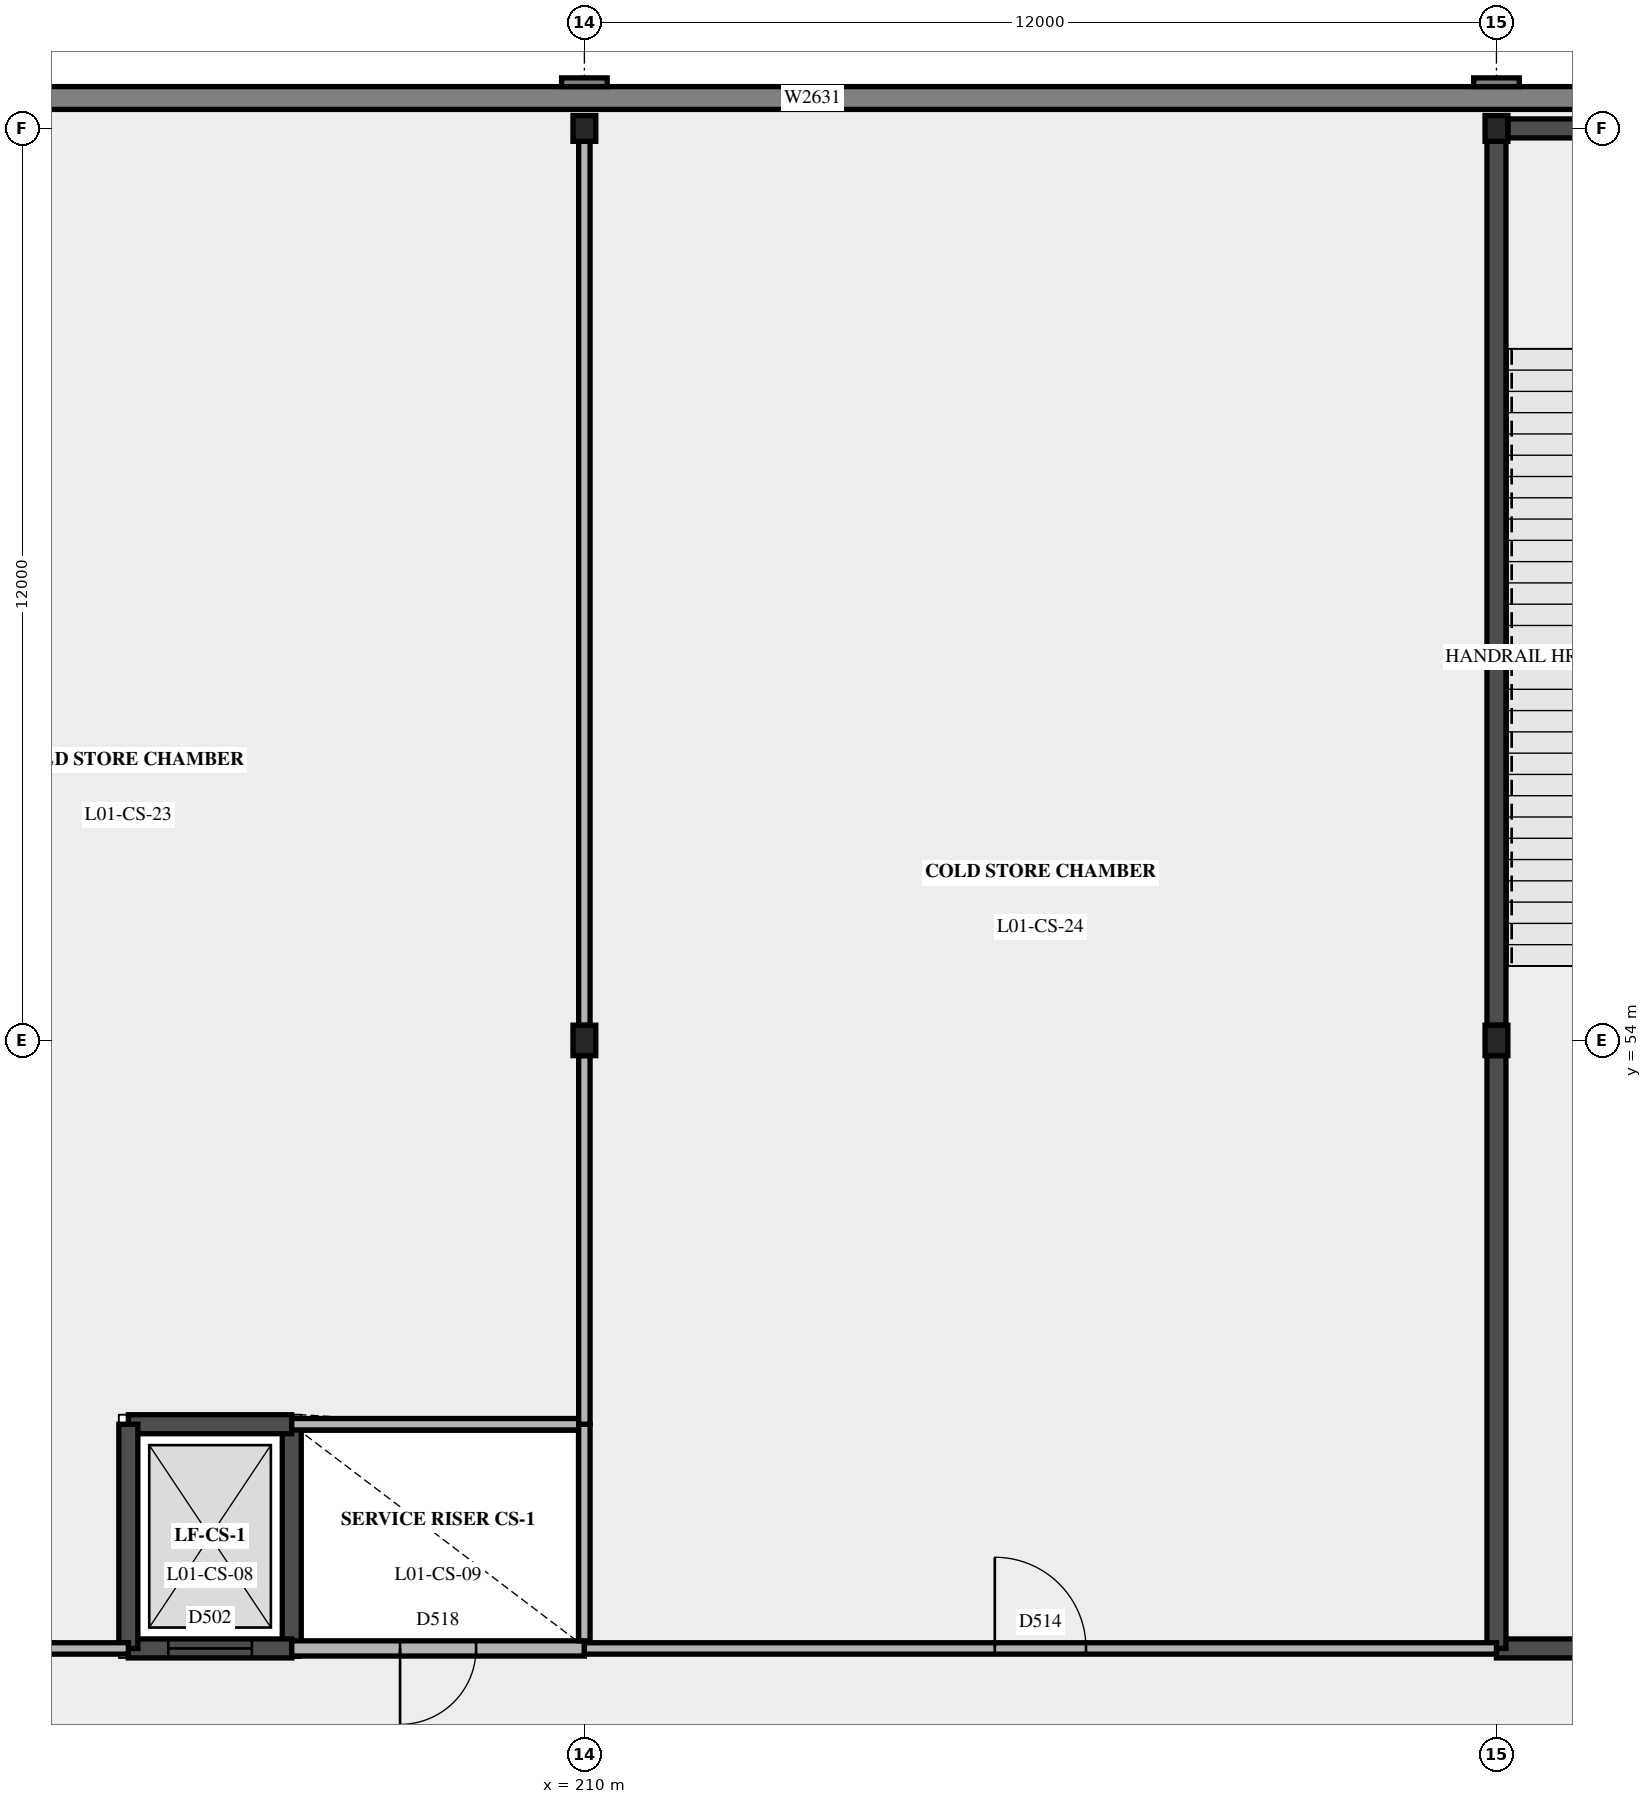
"""IFC4 building model, lengths in metres.
Left out: names, types, materials, properties, quantities, classifications, styles, units other than length and angle.
Written with IfcOpenShell. Run it as: python <this file> out.ifc"""

import sys

from ifc_helpers import new_model, si_unit, direction, frame, frame_2d, origin, origin_2d, place, context, subcontext, project, spatial, polyline, rectangle, i_section, outline, extrude, element, fill, save


model = new_model("IFC4")
c1 = context("Model", 3, precision=1e-05, world=origin(), true_north=direction((0.0, 1.0)))
c2 = subcontext(c1, "Body", "Model", "MODEL_VIEW")
j1 = project(units=[si_unit("LENGTHUNIT", "METRE"), si_unit("PLANEANGLEUNIT", "RADIAN")], contexts=[c1])
p1 = place(None, origin())
s1 = spatial("IfcSite", under=j1, at=p1, CompositionType="ELEMENT")
p2 = place(p1, origin())
s2 = spatial("IfcBuilding", under=s1, at=p2, CompositionType="ELEMENT")
p3 = place(p2, frame((0.0, 0.0, 5.4)))
s3 = spatial("IfcBuildingStorey", under=s2, at=p3, CompositionType="ELEMENT", Elevation=5.4)
p4 = place(p3, frame((210.0, 54.0, 0.0), z_axis=(0.0, 0.0, 1.0), x_axis=(1.0, 0.0, 0.0)))
e1 = element("IfcColumn", 1, at=p4, inside=s3, PredefinedType="COLUMN", context=c2, shape_type="SweptSolid", body=[
    extrude(i_section(OverallWidth=0.3, OverallDepth=0.4, WebThickness=0.013, FlangeThickness=0.024, at=origin_2d()), origin(), (0.0, 0.0, 1.0), 5.4),
])
p5 = place(p3, frame((210.0, 66.0, 0.0), z_axis=(0.0, 0.0, 1.0), x_axis=(1.0, 0.0, 0.0)))
e2 = element("IfcColumn", 2, at=p5, inside=s3, PredefinedType="COLUMN", context=c2, shape_type="SweptSolid", body=[
    extrude(i_section(OverallWidth=0.3, OverallDepth=0.34, WebThickness=0.012, FlangeThickness=0.021, at=origin_2d()), origin(), (0.0, 0.0, 1.0), 5.4),
])
p6 = place(p3, frame((222.0, 54.0, 0.0), z_axis=(0.0, 0.0, 1.0), x_axis=(1.0, 0.0, 0.0)))
e3 = element("IfcColumn", 3, at=p6, inside=s3, PredefinedType="COLUMN", context=c2, shape_type="SweptSolid", body=[
    extrude(i_section(OverallWidth=0.3, OverallDepth=0.4, WebThickness=0.013, FlangeThickness=0.024, at=origin_2d()), origin(), (0.0, 0.0, 1.0), 5.4),
])
p7 = place(p3, frame((222.0, 66.0, 0.0), z_axis=(0.0, 0.0, 1.0), x_axis=(1.0, 0.0, 0.0)))
e4 = element("IfcColumn", 4, at=p7, inside=s3, PredefinedType="COLUMN", context=c2, shape_type="SweptSolid", body=[
    extrude(i_section(OverallWidth=0.3, OverallDepth=0.34, WebThickness=0.012, FlangeThickness=0.021, at=origin_2d()), origin(), (0.0, 0.0, 1.0), 5.4),
])
p8 = place(p3, frame((222.0, 46.0, 0.0), z_axis=(0.0, 0.0, 1.0), x_axis=(1.0, 0.0, 0.0)))
e5 = element("IfcWall", 5, at=p8, inside=s3, PredefinedType="SHEAR", context=c2, shape_type="SweptSolid", body=[
    extrude(rectangle(XDim=6.0, YDim=0.25, at=frame_2d((3.0, 0.0))), origin(), (0.0, 0.0, 1.0), 5.4),
])
p9 = place(p8, frame((2.5, 0.0, 0.0)))
e6 = element("IfcOpeningElement", 6, at=p9, cuts=e5, PredefinedType="OPENING", context=c2, shape_type="SweptSolid", body=[
    extrude(rectangle(XDim=1.0, YDim=2.1, at=frame_2d((0.5, 1.05))), frame((0.0, 0.135, 0.0), z_axis=(0.0, -1.0, 0.0), x_axis=(1.0, 0.0, 0.0)), (0.0, 0.0, 1.0), 0.27),
])
p10 = place(p3, frame((222.15, 66.0, 0.0), z_axis=(0.0, 0.0, 1.0), x_axis=(1.0, 0.0, 0.0)))
e7 = element("IfcWall", 7, at=p10, inside=s3, PredefinedType="SHEAR", context=c2, shape_type="SweptSolid", body=[
    extrude(rectangle(XDim=5.85, YDim=0.25, at=frame_2d((2.925, 0.0))), origin(), (0.0, 0.0, 1.0), 5.4),
])
p11 = place(p3, frame((222.0, 46.0, 0.0), z_axis=(0.0, 0.0, 1.0), x_axis=(0.0, 1.0, 0.0)))
e8 = element("IfcWall", 8, at=p11, inside=s3, PredefinedType="SHEAR", context=c2, shape_type="SweptSolid", body=[
    extrude(rectangle(XDim=7.8, YDim=0.25, at=frame_2d((3.9, 0.0))), origin(), (0.0, 0.0, 1.0), 5.4),
])
p12 = place(p3, frame((222.0, 54.2, 0.0), z_axis=(0.0, 0.0, 1.0), x_axis=(0.0, 1.0, 0.0)))
e9 = element("IfcWall", 9, at=p12, inside=s3, PredefinedType="SHEAR", context=c2, shape_type="SweptSolid", body=[
    extrude(rectangle(XDim=11.63, YDim=0.25, at=frame_2d((5.815, 0.0))), origin(), (0.0, 0.0, 1.0), 5.4),
])
p13 = place(p3, frame((282.25, 66.4, 0.0), z_axis=(0.0, 0.0, 1.0), x_axis=(-1.0, 0.0, 0.0)))
e10 = element("IfcWall", 10, at=p13, inside=s3, PredefinedType="SOLIDWALL", context=c2, shape_type="SweptSolid", body=[
    extrude(rectangle(XDim=84.5, YDim=0.3, at=frame_2d((42.25, 0.0))), origin(), (0.0, 0.0, 1.0), 5.4),
])
p14 = place(p13, frame((9.025, 0.0, 1.8)))
e11 = element("IfcOpeningElement", 11, at=p14, cuts=e10, PredefinedType="OPENING", context=c2, shape_type="SweptSolid", body=[
    extrude(rectangle(XDim=0.45, YDim=2.4, at=frame_2d((0.225, 1.2))), frame((0.0, 0.16, 0.0), z_axis=(0.0, -1.0, 0.0), x_axis=(1.0, 0.0, 0.0)), (0.0, 0.0, 1.0), 0.32),
])
p15 = place(p13, frame((21.025, 0.0, 1.8)))
e12 = element("IfcOpeningElement", 12, at=p15, cuts=e10, PredefinedType="OPENING", context=c2, shape_type="SweptSolid", body=[
    extrude(rectangle(XDim=0.45, YDim=2.4, at=frame_2d((0.225, 1.2))), frame((0.0, 0.16, 0.0), z_axis=(0.0, -1.0, 0.0), x_axis=(1.0, 0.0, 0.0)), (0.0, 0.0, 1.0), 0.32),
])
p16 = place(p13, frame((33.025, 0.0, 1.8)))
e13 = element("IfcOpeningElement", 13, at=p16, cuts=e10, PredefinedType="OPENING", context=c2, shape_type="SweptSolid", body=[
    extrude(rectangle(XDim=0.45, YDim=2.4, at=frame_2d((0.225, 1.2))), frame((0.0, 0.16, 0.0), z_axis=(0.0, -1.0, 0.0), x_axis=(1.0, 0.0, 0.0)), (0.0, 0.0, 1.0), 0.32),
])
p17 = place(p13, frame((45.025, 0.0, 1.8)))
e14 = element("IfcOpeningElement", 14, at=p17, cuts=e10, PredefinedType="OPENING", context=c2, shape_type="SweptSolid", body=[
    extrude(rectangle(XDim=0.45, YDim=2.4, at=frame_2d((0.225, 1.2))), frame((0.0, 0.16, 0.0), z_axis=(0.0, -1.0, 0.0), x_axis=(1.0, 0.0, 0.0)), (0.0, 0.0, 1.0), 0.32),
])
p18 = place(p13, frame((57.025, 0.0, 1.8)))
e15 = element("IfcOpeningElement", 15, at=p18, cuts=e10, PredefinedType="OPENING", context=c2, shape_type="SweptSolid", body=[
    extrude(rectangle(XDim=0.45, YDim=2.4, at=frame_2d((0.225, 1.2))), frame((0.0, 0.16, 0.0), z_axis=(0.0, -1.0, 0.0), x_axis=(1.0, 0.0, 0.0)), (0.0, 0.0, 1.0), 0.32),
])
p19 = place(p13, frame((69.025, 0.0, 1.8)))
e16 = element("IfcOpeningElement", 16, at=p19, cuts=e10, PredefinedType="OPENING", context=c2, shape_type="SweptSolid", body=[
    extrude(rectangle(XDim=0.45, YDim=2.4, at=frame_2d((0.225, 1.2))), frame((0.0, 0.16, 0.0), z_axis=(0.0, -1.0, 0.0), x_axis=(1.0, 0.0, 0.0)), (0.0, 0.0, 1.0), 0.32),
])
p20 = place(p13, frame((81.025, 0.0, 1.8)))
e17 = element("IfcOpeningElement", 17, at=p20, cuts=e10, PredefinedType="OPENING", context=c2, shape_type="SweptSolid", body=[
    extrude(rectangle(XDim=0.45, YDim=2.4, at=frame_2d((0.225, 1.2))), frame((0.0, 0.16, 0.0), z_axis=(0.0, -1.0, 0.0), x_axis=(1.0, 0.0, 0.0)), (0.0, 0.0, 1.0), 0.32),
])
for number, where, z_axis, x_axis in (
    (18, (222.3, 66.607, 0.0), (0.0, 0.0, 1.0), (-1.0, 0.0, 0.0)),
    (19, (210.3, 66.607, 0.0), (0.0, 0.0, 1.0), (-1.0, 0.0, 0.0)),
):
    element("IfcWall", number, at=place(p3, frame(where, z_axis=z_axis, x_axis=x_axis)), inside=s3, PredefinedType="SOLIDWALL", context=c2, shape_type="SweptSolid", body=[
        extrude(rectangle(XDim=0.6, YDim=0.115, at=frame_2d((0.3, 0.0))), origin(), (0.0, 0.0, 1.0), 5.4),
    ])
p21 = place(p3, frame((206.15, 46.0, 0.0), z_axis=(0.0, 0.0, 1.0), x_axis=(0.0, 1.0, 0.0)))
e20 = element("IfcWall", 20, at=p21, inside=s3, PredefinedType="SHEAR", context=c2, shape_type="SweptSolid", body=[
    extrude(rectangle(XDim=2.95, YDim=0.25, at=frame_2d((1.475, 0.0))), origin(), (0.0, 0.0, 1.0), 5.4),
])
p22 = place(p3, frame((206.15, 48.95, 0.0), z_axis=(0.0, 0.0, 1.0), x_axis=(-1.0, 0.0, 0.0)))
e21 = element("IfcWall", 21, at=p22, inside=s3, PredefinedType="SHEAR", context=c2, shape_type="SweptSolid", body=[
    extrude(rectangle(XDim=2.15, YDim=0.25, at=frame_2d((1.075, 0.0))), origin(), (0.0, 0.0, 1.0), 5.4),
])
p23 = place(p3, frame((204.0, 46.0, 0.0), z_axis=(0.0, 0.0, 1.0), x_axis=(1.0, 0.0, 0.0)))
e22 = element("IfcWall", 22, at=p23, inside=s3, PredefinedType="SHEAR", context=c2, shape_type="SweptSolid", body=[
    extrude(rectangle(XDim=2.15, YDim=0.25, at=frame_2d((1.075, 0.0))), origin(), (0.0, 0.0, 1.0), 5.4),
])
p24 = place(p23, frame((0.525, 0.0, 0.0)))
e23 = element("IfcOpeningElement", 23, at=p24, cuts=e22, PredefinedType="OPENING", context=c2, shape_type="SweptSolid", body=[
    extrude(rectangle(XDim=1.1, YDim=2.1, at=frame_2d((0.55, 1.05))), frame((0.0, 0.135, 0.0), z_axis=(0.0, -1.0, 0.0), x_axis=(1.0, 0.0, 0.0)), (0.0, 0.0, 1.0), 0.27),
])
p25 = place(p3, frame((204.0, 48.95, 0.0), z_axis=(0.0, 0.0, 1.0), x_axis=(0.0, -1.0, 0.0)))
e24 = element("IfcWall", 24, at=p25, inside=s3, PredefinedType="SHEAR", context=c2, shape_type="SweptSolid", body=[
    extrude(rectangle(XDim=2.95, YDim=0.25, at=frame_2d((1.475, 0.0))), origin(), (0.0, 0.0, 1.0), 5.4),
])
p26 = place(p3, frame((198.0, 46.0, 0.0), z_axis=(0.0, 0.0, 1.0), x_axis=(1.0, 0.0, 0.0)))
e25 = element("IfcWall", 25, at=p26, inside=s3, PredefinedType="PARTITIONING", context=c2, shape_type="SweptSolid", body=[
    extrude(outline(polyline([(0.0, 0.0), (6.0, 0.0), (6.0, 5.15), (4.905, 5.15), (4.9, 4.63), (4.7, 4.63), (4.695, 5.15), (2.505, 5.15), (2.5, 4.63), (2.3, 4.63), (2.295, 5.15), (0.1, 5.15), (0.095, 4.68), (0.0, 4.68), (0.0, 0.0)])), frame((0.0, 0.075, 0.0), z_axis=(0.0, -1.0, 0.0), x_axis=(1.0, 0.0, 0.0)), (0.0, 0.0, 1.0), 0.15),
])
p27 = place(p26, frame((2.4, 0.0, 0.0)))
e26 = element("IfcOpeningElement", 26, at=p27, cuts=e25, PredefinedType="OPENING", context=c2, shape_type="SweptSolid", body=[
    extrude(rectangle(XDim=1.2, YDim=2.4, at=frame_2d((0.6, 1.2))), frame((0.0, 0.085, 0.0), z_axis=(0.0, -1.0, 0.0), x_axis=(1.0, 0.0, 0.0)), (0.0, 0.0, 1.0), 0.17),
])
p28 = place(p3, frame((206.15, 46.0, 0.0), z_axis=(0.0, 0.0, 1.0), x_axis=(1.0, 0.0, 0.0)))
e27 = element("IfcWall", 27, at=p28, inside=s3, PredefinedType="PARTITIONING", context=c2, shape_type="SweptSolid", body=[
    extrude(outline(polyline([(0.0, 0.0), (3.85, 0.0), (3.85, 4.68), (3.755, 4.68), (3.75, 5.15), (1.555, 5.15), (1.55, 4.63), (1.35, 4.63), (1.345, 5.15), (0.0, 5.15), (0.0, 0.0)])), frame((0.0, 0.1, 0.0), z_axis=(0.0, -1.0, 0.0), x_axis=(1.0, 0.0, 0.0)), (0.0, 0.0, 1.0), 0.2),
])
p29 = place(p28, frame((1.425, 0.0, 0.0)))
e28 = element("IfcOpeningElement", 28, at=p29, cuts=e27, PredefinedType="OPENING", context=c2, shape_type="SweptSolid", body=[
    extrude(rectangle(XDim=1.0, YDim=2.1, at=frame_2d((0.5, 1.05))), frame((0.0, 0.11, 0.0), z_axis=(0.0, -1.0, 0.0), x_axis=(1.0, 0.0, 0.0)), (0.0, 0.0, 1.0), 0.22),
])
p30 = place(p3, frame((210.0, 46.0, 0.0), z_axis=(0.0, 0.0, 1.0), x_axis=(1.0, 0.0, 0.0)))
e29 = element("IfcWall", 29, at=p30, inside=s3, PredefinedType="PARTITIONING", context=c2, shape_type="SweptSolid", body=[
    extrude(outline(polyline([(0.0, 0.0), (12.0, 0.0), (12.0, 5.15), (9.705, 5.15), (9.7, 4.63), (9.5, 4.63), (9.495, 5.15), (7.305, 5.15), (7.3, 4.63), (7.1, 4.63), (7.095, 5.15), (4.905, 5.15), (4.9, 4.63), (4.7, 4.63), (4.695, 5.15), (2.505, 5.15), (2.5, 4.63), (2.3, 4.63), (2.295, 5.15), (0.1, 5.15), (0.095, 4.68), (0.0, 4.68), (0.0, 0.0)])), frame((0.0, 0.075, 0.0), z_axis=(0.0, -1.0, 0.0), x_axis=(1.0, 0.0, 0.0)), (0.0, 0.0, 1.0), 0.15),
])
p31 = place(p30, frame((5.4, 0.0, 0.0)))
e30 = element("IfcOpeningElement", 30, at=p31, cuts=e29, PredefinedType="OPENING", context=c2, shape_type="SweptSolid", body=[
    extrude(rectangle(XDim=1.2, YDim=2.4, at=frame_2d((0.6, 1.2))), frame((0.0, 0.085, 0.0), z_axis=(0.0, -1.0, 0.0), x_axis=(1.0, 0.0, 0.0)), (0.0, 0.0, 1.0), 0.17),
])
p32 = place(p3, frame((206.15, 48.95, 0.0), z_axis=(0.0, 0.0, 1.0), x_axis=(1.0, 0.0, 0.0)))
e31 = element("IfcWall", 31, at=p32, inside=s3, PredefinedType="PARTITIONING", context=c2, shape_type="SweptSolid", body=[
    extrude(outline(polyline([(0.0, 0.0), (3.775, 0.0), (3.775, 4.68), (3.755, 4.68), (3.75, 5.15), (1.555, 5.15), (1.55, 4.63), (1.35, 4.63), (1.345, 5.15), (0.0, 5.15), (0.0, 0.0)])), frame((0.0, 0.075, 0.0), z_axis=(0.0, -1.0, 0.0), x_axis=(1.0, 0.0, 0.0)), (0.0, 0.0, 1.0), 0.15),
])
p33 = place(p3, frame((210.0, 46.1, 0.0), z_axis=(0.0, 0.0, 1.0), x_axis=(0.0, 1.0, 0.0)))
e32 = element("IfcWall", 32, at=p33, inside=s3, PredefinedType="PARTITIONING", context=c2, shape_type="SweptSolid", body=[
    extrude(rectangle(XDim=2.85, YDim=0.15, at=frame_2d((1.425, 0.0))), origin(), (0.0, 0.0, 1.0), 4.68),
])
p34 = place(p3, frame((210.0, 48.95, 0.0), z_axis=(0.0, 0.0, 1.0), x_axis=(0.0, 1.0, 0.0)))
e33 = element("IfcWall", 33, at=p34, inside=s3, PredefinedType="PARTITIONING", context=c2, shape_type="SweptSolid", body=[
    extrude(rectangle(XDim=4.85, YDim=0.15, at=frame_2d((2.425, 0.0))), origin(), (0.0, 0.0, 1.0), 4.68),
])
p35 = place(p3, frame((210.0, 54.2, 0.0), z_axis=(0.0, 0.0, 1.0), x_axis=(0.0, 1.0, 0.0)))
e34 = element("IfcWall", 34, at=p35, inside=s3, PredefinedType="PARTITIONING", context=c2, shape_type="SweptSolid", body=[
    extrude(rectangle(XDim=11.63, YDim=0.15, at=frame_2d((5.815, 0.0))), origin(), (0.0, 0.0, 1.0), 4.68),
])
p36 = place(p19, origin())
e35 = element("IfcWindow", 35, at=p36, inside=s3, PartitioningType="SINGLE_PANEL", PredefinedType="WINDOW", context=c2, shape_type="SweptSolid", body=[
    extrude(rectangle(XDim=0.45, YDim=2.4, at=frame_2d((0.225, 1.2))), frame((0.0, 0.03, 0.0), z_axis=(0.0, -1.0, 0.0), x_axis=(1.0, 0.0, 0.0)), (0.0, 0.0, 1.0), 0.06),
])
fill(e16, e35)
p37 = place(p24, origin())
e36 = element("IfcDoor", 36, at=p37, inside=s3, OperationType="SLIDING_TO_LEFT", PredefinedType="DOOR", context=c2, shape_type="SweptSolid", body=[
    extrude(rectangle(XDim=1.1, YDim=2.1, at=frame_2d((0.55, 1.05))), frame((0.0, 0.025, 0.0), z_axis=(0.0, -1.0, 0.0), x_axis=(1.0, 0.0, 0.0)), (0.0, 0.0, 1.0), 0.05),
])
fill(e23, e36)
p38 = place(p31, origin())
e37 = element("IfcDoor", 37, at=p38, inside=s3, OperationType="SINGLE_SWING_LEFT", PredefinedType="DOOR", context=c2, shape_type="SweptSolid", body=[
    extrude(rectangle(XDim=1.2, YDim=2.4, at=frame_2d((0.6, 1.2))), frame((0.0, 0.025, 0.0), z_axis=(0.0, -1.0, 0.0), x_axis=(1.0, 0.0, 0.0)), (0.0, 0.0, 1.0), 0.05),
])
fill(e30, e37)
p39 = place(p29, origin())
e38 = element("IfcDoor", 38, at=p39, inside=s3, OperationType="SINGLE_SWING_RIGHT", PredefinedType="DOOR", context=c2, shape_type="SweptSolid", body=[
    extrude(rectangle(XDim=1.0, YDim=2.1, at=frame_2d((0.5, 1.05))), frame((0.0, 0.025, 0.0), z_axis=(0.0, -1.0, 0.0), x_axis=(1.0, 0.0, 0.0)), (0.0, 0.0, 1.0), 0.05),
])
fill(e28, e38)
save(model, sys.argv[1])
